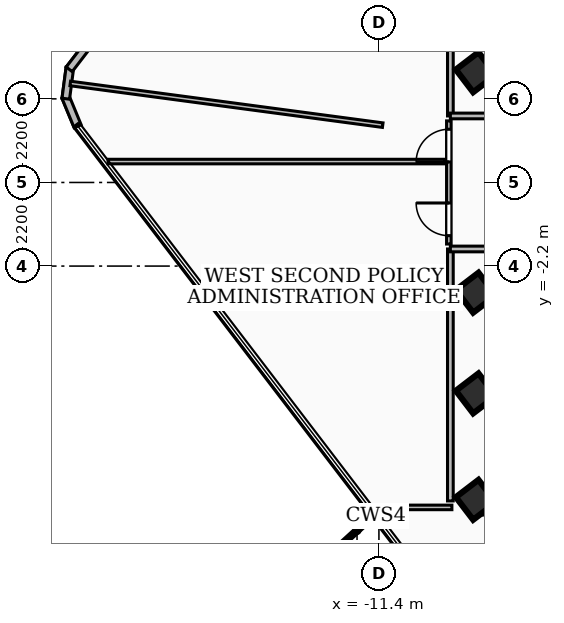
"""IFC4 building model, lengths in metres.
Left out: names, types, materials, properties, quantities, classifications, styles, units other than length and angle.
Written with IfcOpenShell. Run it as: python <this file> out.ifc"""

import sys

from ifc_helpers import new_model, si_unit, direction, frame, frame_2d, origin, origin_2d, place, context, subcontext, project, spatial, rectangle, extrude, element, fill, save


model = new_model("IFC4")
c1 = context("Model", 3, precision=1e-05, world=origin(), true_north=direction((0.0, 1.0)))
c2 = subcontext(c1, "Body", "Model", "MODEL_VIEW")
j1 = project(units=[si_unit("LENGTHUNIT", "METRE"), si_unit("PLANEANGLEUNIT", "RADIAN")], contexts=[c1])
p1 = place(None, origin())
s1 = spatial("IfcSite", under=j1, at=p1, CompositionType="ELEMENT")
p2 = place(p1, origin())
s2 = spatial("IfcBuilding", under=s1, at=p2, CompositionType="ELEMENT")
p3 = place(p2, frame((0.0, 0.0, 229.14)))
s3 = spatial("IfcBuildingStorey", under=s2, at=p3, CompositionType="ELEMENT", Elevation=229.14)
p4 = place(p3, frame((8.78, -8.51, 0.0), z_axis=(0.0, 0.0, 1.0), x_axis=(-1.0, 0.0, 0.0)))
e1 = element("IfcWall", 1, at=p4, inside=s3, PredefinedType="SHEAR", context=c2, shape_type="SweptSolid", body=[
    extrude(rectangle(XDim=17.56, YDim=0.4, at=frame_2d((8.78, 0.0))), origin(), (0.0, 0.0, 1.0), 3.14),
])
for number, where, z_axis, x_axis in (
    (2, (-8.85, -5.55, 0.0), (0.0, 0.0, 1.0), (0.794, 0.607, 0.0)),
    (3, (-8.85, -2.9, 0.0), (0.0, 0.0, 1.0), (0.794, 0.607, 0.0)),
    (4, (-8.85, 2.9, 0.0), (0.0, 0.0, 1.0), (0.794, 0.607, 0.0)),
    (5, (-8.85, -8.35, 0.0), (0.0, 0.0, 1.0), (0.794, 0.607, 0.0)),
):
    element("IfcColumn", number, at=place(p3, frame(where, z_axis=z_axis, x_axis=x_axis)), inside=s3, PredefinedType="COLUMN", context=c2, shape_type="SweptSolid", body=[
        extrude(rectangle(XDim=0.75, YDim=0.75, at=origin_2d()), origin(), (0.0, 0.0, 1.0), 3.42),
    ])
p5 = place(p3, frame((-19.327, 1.478, 0.0), z_axis=(0.0, 0.0, 1.0), x_axis=(-0.382171551451, 0.924091394431, 0.0)))
e6 = element("IfcWall", 6, at=p5, inside=s3, PredefinedType="SOLIDWALL", context=c2, shape_type="SweptSolid", body=[
    extrude(rectangle(XDim=0.837, YDim=0.2, at=frame_2d((0.419, 0.0))), origin(), (0.0, 0.0, 1.0), 3.14),
])
p6 = place(p3, frame((-19.64, 2.204, 0.0), z_axis=(0.0, 0.0, 1.0), x_axis=(0.130806653943, 0.99140789753, 0.0)))
e7 = element("IfcWall", 7, at=p6, inside=s3, PredefinedType="SOLIDWALL", context=c2, shape_type="SweptSolid", body=[
    extrude(rectangle(XDim=0.825, YDim=0.2, at=frame_2d((0.413, 0.0))), origin(), (0.0, 0.0, 1.0), 3.14),
])
p7 = place(p3, frame((-19.55, 2.977, 0.0), z_axis=(0.0, 0.0, 1.0), x_axis=(0.609274558022, 0.792959338773, 0.0)))
e8 = element("IfcWall", 8, at=p7, inside=s3, PredefinedType="SOLIDWALL", context=c2, shape_type="SweptSolid", body=[
    extrude(rectangle(XDim=0.839, YDim=0.2, at=frame_2d((0.419, 0.0))), origin(), (0.0, 0.0, 1.0), 3.14),
])
p8 = place(p3, frame((-9.52, 1.75, 0.0), z_axis=(0.0, 0.0, 1.0), x_axis=(0.0, 1.0, 0.0)))
e9 = element("IfcWall", 9, at=p8, inside=s3, PredefinedType="PARTITIONING", context=c2, shape_type="SweptSolid", body=[
    extrude(rectangle(XDim=6.63, YDim=0.15, at=frame_2d((3.315, 0.0))), origin(), (0.0, 0.0, 1.0), 3.14),
])
p9 = place(p3, frame((-7.85, 1.75, 0.0), z_axis=(0.0, 0.0, 1.0), x_axis=(-1.0, 0.0, 0.0)))
e10 = element("IfcWall", 10, at=p9, inside=s3, PredefinedType="PARTITIONING", context=c2, shape_type="SweptSolid", body=[
    extrude(rectangle(XDim=1.67, YDim=0.15, at=frame_2d((0.835, 0.0))), origin(), (0.0, 0.0, 1.0), 2.37),
])
p10 = place(p3, frame((-9.52, -8.38, 0.0), z_axis=(0.0, 0.0, 1.0), x_axis=(0.0, 1.0, 0.0)))
e11 = element("IfcWall", 11, at=p10, inside=s3, PredefinedType="PARTITIONING", context=c2, shape_type="SweptSolid", body=[
    extrude(rectangle(XDim=6.63, YDim=0.15, at=frame_2d((3.315, 0.0))), origin(), (0.0, 0.0, 1.0), 3.14),
])
p11 = place(p3, frame((-7.85, -1.75, 0.0), z_axis=(0.0, 0.0, 1.0), x_axis=(-1.0, 0.0, 0.0)))
e12 = element("IfcWall", 12, at=p11, inside=s3, PredefinedType="PARTITIONING", context=c2, shape_type="SweptSolid", body=[
    extrude(rectangle(XDim=1.67, YDim=0.15, at=frame_2d((0.835, 0.0))), origin(), (0.0, 0.0, 1.0), 2.37),
])
p12 = place(p3, frame((-18.528, 0.55, 0.0), z_axis=(0.0, 0.0, 1.0), x_axis=(1.0, 0.0, 0.0)))
e13 = element("IfcWall", 13, at=p12, inside=s3, PredefinedType="PARTITIONING", context=c2, shape_type="SweptSolid", body=[
    extrude(rectangle(XDim=8.868, YDim=0.12, at=frame_2d((4.434, 0.0))), origin(), (0.0, 0.0, 1.0), 3.14),
])
p13 = place(p3, frame((-11.571, -8.55, 0.0), z_axis=(0.0, 0.0, 1.0), x_axis=(1.0, 0.0, 0.0)))
e14 = element("IfcWall", 14, at=p13, inside=s3, PredefinedType="PARTITIONING", context=c2, shape_type="SweptSolid", body=[
    extrude(rectangle(XDim=2.091, YDim=0.12, at=frame_2d((1.045, 0.0))), origin(), (0.0, 0.0, 1.0), 3.14),
])
p14 = place(p3, frame((-9.56, -1.62, 0.0), z_axis=(0.0, 0.0, 1.0), x_axis=(0.0, 1.0, 0.0)))
e15 = element("IfcWall", 15, at=p14, inside=s3, PredefinedType="PARTITIONING", context=c2, shape_type="SweptSolid", body=[
    extrude(rectangle(XDim=3.24, YDim=0.12, at=frame_2d((1.62, 0.0))), origin(), (0.0, 0.0, 1.0), 3.14),
])
p15 = place(p14, frame((0.22, 0.0, 0.0)))
e16 = element("IfcOpeningElement", 16, at=p15, cuts=e15, PredefinedType="OPENING", context=c2, shape_type="SweptSolid", body=[
    extrude(rectangle(XDim=0.86, YDim=2.04, at=frame_2d((0.43, 1.02))), frame((0.0, 0.07, 0.0), z_axis=(0.0, -1.0, 0.0), x_axis=(1.0, 0.0, 0.0)), (0.0, 0.0, 1.0), 0.14),
])
p16 = place(p14, frame((2.16, 0.0, 0.0)))
e17 = element("IfcOpeningElement", 17, at=p16, cuts=e15, PredefinedType="OPENING", context=c2, shape_type="SweptSolid", body=[
    extrude(rectangle(XDim=0.86, YDim=2.04, at=frame_2d((0.43, 1.02))), frame((0.0, 0.07, 0.0), z_axis=(0.0, -1.0, 0.0), x_axis=(1.0, 0.0, 0.0)), (0.0, 0.0, 1.0), 0.14),
])
p17 = place(p3, frame((-11.3, 1.508, 0.0), z_axis=(0.0, 0.0, 1.0), x_axis=(-0.99121735818, 0.132242764804, 0.0)))
e18 = element("IfcWall", 18, at=p17, inside=s3, PredefinedType="PARTITIONING", context=c2, shape_type="SweptSolid", body=[
    extrude(rectangle(XDim=8.295, YDim=0.12, at=frame_2d((4.147, 0.0))), origin(), (0.0, 0.0, 1.0), 3.14),
])
p18 = place(p15, origin())
e19 = element("IfcDoor", 19, at=p18, inside=s3, OperationType="SINGLE_SWING_RIGHT", PredefinedType="DOOR", context=c2, shape_type="SweptSolid", body=[
    extrude(rectangle(XDim=0.86, YDim=2.04, at=frame_2d((0.43, 1.02))), frame((0.0, 0.025, 0.0), z_axis=(0.0, -1.0, 0.0), x_axis=(1.0, 0.0, 0.0)), (0.0, 0.0, 1.0), 0.05),
])
fill(e16, e19)
p19 = place(p16, origin())
e20 = element("IfcDoor", 20, at=p19, inside=s3, OperationType="SINGLE_SWING_LEFT", PredefinedType="DOOR", context=c2, shape_type="SweptSolid", body=[
    extrude(rectangle(XDim=0.86, YDim=2.04, at=frame_2d((0.43, 1.02))), frame((0.0, 0.025, 0.0), z_axis=(0.0, -1.0, 0.0), x_axis=(1.0, 0.0, 0.0)), (0.0, 0.0, 1.0), 0.05),
])
fill(e17, e20)
save(model, sys.argv[1])
